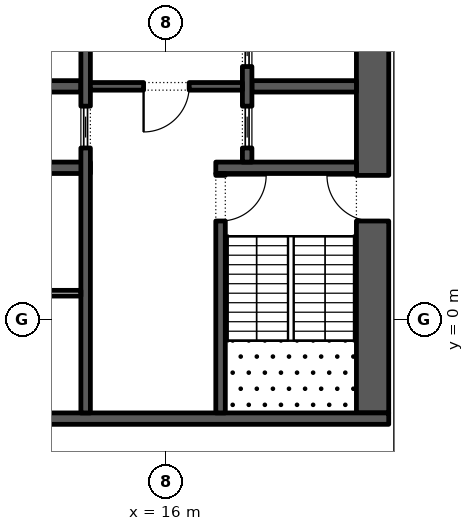
"""IFC4 building model, lengths in metres.
Left out: names, types, materials, properties, quantities, classifications, styles, units other than length and angle.
Written with IfcOpenShell. Run it as: python <this file> out.ifc"""

import sys

from ifc_helpers import new_model, si_unit, direction, frame, frame_2d, origin, place, context, subcontext, project, spatial, rectangle, extrude, element, fill, save


model = new_model("IFC4")
c1 = context("Model", 3, precision=1e-05, world=origin(), true_north=direction((0.0, 1.0)))
c2 = subcontext(c1, "Body", "Model", "MODEL_VIEW")
j1 = project(units=[si_unit("LENGTHUNIT", "METRE"), si_unit("PLANEANGLEUNIT", "RADIAN")], contexts=[c1])
p1 = place(None, origin())
s1 = spatial("IfcSite", under=j1, at=p1, CompositionType="ELEMENT")
p2 = place(p1, origin())
s2 = spatial("IfcBuilding", under=s1, at=p2, CompositionType="ELEMENT")
p3 = place(p2, frame((0.0, 0.0, 109.8)))
s3 = spatial("IfcBuildingStorey", under=s2, at=p3, CompositionType="ELEMENT", Elevation=109.8)
p4 = place(p3, frame((21.425, -2.45, 0.0), z_axis=(0.0, 0.0, 1.0), x_axis=(0.0, 1.0, 0.0)))
e1 = element("IfcWall", 1, at=p4, inside=s3, PredefinedType="SHEAR", context=c2, shape_type="SweptSolid", body=[
    extrude(rectangle(XDim=27.9, YDim=0.85, at=frame_2d((13.95, 0.0))), origin(), (0.0, 0.0, 1.0), 4.0),
])
p5 = place(p4, frame((5.05, 0.0, 0.0)))
e2 = element("IfcOpeningElement", 2, at=p5, cuts=e1, PredefinedType="OPENING", context=c2, shape_type="SweptSolid", body=[
    extrude(rectangle(XDim=1.2, YDim=2.1, at=frame_2d((0.6, 1.05))), frame((0.0, 0.435, 0.0), z_axis=(0.0, -1.0, 0.0), x_axis=(1.0, 0.0, 0.0)), (0.0, 0.0, 1.0), 0.87),
])
p6 = place(p4, frame((21.65, 0.0, 0.0)))
e3 = element("IfcOpeningElement", 3, at=p6, cuts=e1, PredefinedType="OPENING", context=c2, shape_type="SweptSolid", body=[
    extrude(rectangle(XDim=1.2, YDim=2.1, at=frame_2d((0.6, 1.05))), frame((0.0, 0.435, 0.0), z_axis=(0.0, -1.0, 0.0), x_axis=(1.0, 0.0, 0.0)), (0.0, 0.0, 1.0), 0.87),
])
p7 = place(p3, frame((10.15, -2.6, 0.0), z_axis=(0.0, 0.0, 1.0), x_axis=(1.0, 0.0, 0.0)))
e4 = element("IfcWall", 4, at=p7, inside=s3, PredefinedType="SHEAR", context=c2, shape_type="SweptSolid", body=[
    extrude(rectangle(XDim=11.7, YDim=0.3, at=frame_2d((5.85, 0.0))), origin(), (0.0, 0.0, 1.0), 4.0),
])
p8 = place(p3, frame((17.3, 4.0, 0.0), z_axis=(0.0, 0.0, 1.0), x_axis=(1.0, 0.0, 0.0)))
e5 = element("IfcWall", 5, at=p8, inside=s3, PredefinedType="SHEAR", context=c2, shape_type="SweptSolid", body=[
    extrude(rectangle(XDim=3.7, YDim=0.3, at=frame_2d((1.85, 0.0))), origin(), (0.0, 0.0, 1.0), 4.0),
])
p9 = place(p3, frame((17.425, -2.45, 0.0), z_axis=(0.0, 0.0, 1.0), x_axis=(0.0, 1.0, 0.0)))
e6 = element("IfcWall", 6, at=p9, inside=s3, PredefinedType="SHEAR", context=c2, shape_type="SweptSolid", body=[
    extrude(rectangle(XDim=6.3, YDim=0.25, at=frame_2d((3.15, 0.0))), origin(), (0.0, 0.0, 1.0), 4.0),
])
p10 = place(p9, frame((5.05, 0.0, 0.0)))
e7 = element("IfcOpeningElement", 7, at=p10, cuts=e6, PredefinedType="OPENING", context=c2, shape_type="SweptSolid", body=[
    extrude(rectangle(XDim=1.2, YDim=2.1, at=frame_2d((0.6, 1.05))), frame((0.0, 0.135, 0.0), z_axis=(0.0, -1.0, 0.0), x_axis=(1.0, 0.0, 0.0)), (0.0, 0.0, 1.0), 0.27),
])
p11 = place(p3, frame((18.25, 6.143, 0.0), z_axis=(0.0, 0.0, 1.0), x_axis=(1.0, 0.0, 0.0)))
e8 = element("IfcWall", 8, at=p11, inside=s3, PredefinedType="SHEAR", context=c2, shape_type="SweptSolid", body=[
    extrude(rectangle(XDim=2.75, YDim=0.3, at=frame_2d((1.375, 0.0))), origin(), (0.0, 0.0, 1.0), 4.0),
])
p12 = place(p3, frame((18.125, 4.15, 0.0), z_axis=(0.0, 0.0, 1.0), x_axis=(0.0, 1.0, 0.0)))
e9 = element("IfcWall", 9, at=p12, inside=s3, PredefinedType="SHEAR", context=c2, shape_type="SweptSolid", body=[
    extrude(rectangle(XDim=14.7, YDim=0.25, at=frame_2d((7.35, 0.0))), origin(), (0.0, 0.0, 1.0), 4.0),
])
p13 = place(p12, frame((0.371, 0.0, 0.0)))
e10 = element("IfcOpeningElement", 10, at=p13, cuts=e9, PredefinedType="OPENING", context=c2, shape_type="SweptSolid", body=[
    extrude(rectangle(XDim=1.1, YDim=2.1, at=frame_2d((0.55, 1.05))), frame((0.0, 0.135, 0.0), z_axis=(0.0, -1.0, 0.0), x_axis=(1.0, 0.0, 0.0)), (0.0, 0.0, 1.0), 0.27),
])
p14 = place(p12, frame((2.514, 0.0, 0.0)))
e11 = element("IfcOpeningElement", 11, at=p14, cuts=e9, PredefinedType="OPENING", context=c2, shape_type="SweptSolid", body=[
    extrude(rectangle(XDim=1.1, YDim=2.1, at=frame_2d((0.55, 1.05))), frame((0.0, 0.135, 0.0), z_axis=(0.0, -1.0, 0.0), x_axis=(1.0, 0.0, 0.0)), (0.0, 0.0, 1.0), 0.27),
])
p15 = place(p12, frame((4.657, 0.0, 0.0)))
e12 = element("IfcOpeningElement", 12, at=p15, cuts=e9, PredefinedType="OPENING", context=c2, shape_type="SweptSolid", body=[
    extrude(rectangle(XDim=1.1, YDim=2.1, at=frame_2d((0.55, 1.05))), frame((0.0, 0.135, 0.0), z_axis=(0.0, -1.0, 0.0), x_axis=(1.0, 0.0, 0.0)), (0.0, 0.0, 1.0), 0.27),
])
p16 = place(p12, frame((6.8, 0.0, 0.0)))
e13 = element("IfcOpeningElement", 13, at=p16, cuts=e9, PredefinedType="OPENING", context=c2, shape_type="SweptSolid", body=[
    extrude(rectangle(XDim=1.1, YDim=2.1, at=frame_2d((0.55, 1.05))), frame((0.0, 0.135, 0.0), z_axis=(0.0, -1.0, 0.0), x_axis=(1.0, 0.0, 0.0)), (0.0, 0.0, 1.0), 0.27),
])
p17 = place(p12, frame((8.943, 0.0, 0.0)))
e14 = element("IfcOpeningElement", 14, at=p17, cuts=e9, PredefinedType="OPENING", context=c2, shape_type="SweptSolid", body=[
    extrude(rectangle(XDim=1.1, YDim=2.1, at=frame_2d((0.55, 1.05))), frame((0.0, 0.135, 0.0), z_axis=(0.0, -1.0, 0.0), x_axis=(1.0, 0.0, 0.0)), (0.0, 0.0, 1.0), 0.27),
])
p18 = place(p12, frame((11.086, 0.0, 0.0)))
e15 = element("IfcOpeningElement", 15, at=p18, cuts=e9, PredefinedType="OPENING", context=c2, shape_type="SweptSolid", body=[
    extrude(rectangle(XDim=1.1, YDim=2.1, at=frame_2d((0.55, 1.05))), frame((0.0, 0.135, 0.0), z_axis=(0.0, -1.0, 0.0), x_axis=(1.0, 0.0, 0.0)), (0.0, 0.0, 1.0), 0.27),
])
p19 = place(p12, frame((13.229, 0.0, 0.0)))
e16 = element("IfcOpeningElement", 16, at=p19, cuts=e9, PredefinedType="OPENING", context=c2, shape_type="SweptSolid", body=[
    extrude(rectangle(XDim=1.1, YDim=2.1, at=frame_2d((0.55, 1.05))), frame((0.0, 0.135, 0.0), z_axis=(0.0, -1.0, 0.0), x_axis=(1.0, 0.0, 0.0)), (0.0, 0.0, 1.0), 0.27),
])
p20 = place(p3, frame((11.0, 4.0, 0.0), z_axis=(0.0, 0.0, 1.0), x_axis=(1.0, 0.0, 0.0)))
e17 = element("IfcWall", 17, at=p20, inside=s3, PredefinedType="SHEAR", context=c2, shape_type="SweptSolid", body=[
    extrude(rectangle(XDim=3.0, YDim=0.3, at=frame_2d((1.5, 0.0))), origin(), (0.0, 0.0, 1.0), 4.0),
])
p21 = place(p3, frame((11.0, 6.143, 0.0), z_axis=(0.0, 0.0, 1.0), x_axis=(1.0, 0.0, 0.0)))
e18 = element("IfcWall", 18, at=p21, inside=s3, PredefinedType="SHEAR", context=c2, shape_type="SweptSolid", body=[
    extrude(rectangle(XDim=2.75, YDim=0.3, at=frame_2d((1.375, 0.0))), origin(), (0.0, 0.0, 1.0), 4.0),
])
p22 = place(p3, frame((13.875, -2.45, 0.0), z_axis=(0.0, 0.0, 1.0), x_axis=(0.0, 1.0, 0.0)))
e19 = element("IfcWall", 19, at=p22, inside=s3, PredefinedType="SHEAR", context=c2, shape_type="SweptSolid", body=[
    extrude(rectangle(XDim=21.3, YDim=0.25, at=frame_2d((10.65, 0.0))), origin(), (0.0, 0.0, 1.0), 4.0),
])
p23 = place(p22, frame((14.571, 0.0, 0.0)))
e20 = element("IfcOpeningElement", 20, at=p23, cuts=e19, PredefinedType="OPENING", context=c2, shape_type="SweptSolid", body=[
    extrude(rectangle(XDim=0.9, YDim=2.1, at=frame_2d((0.45, 1.05))), frame((0.0, 0.135, 0.0), z_axis=(0.0, -1.0, 0.0), x_axis=(1.0, 0.0, 0.0)), (0.0, 0.0, 1.0), 0.27),
])
p24 = place(p22, frame((6.971, 0.0, 0.0)))
e21 = element("IfcOpeningElement", 21, at=p24, cuts=e19, PredefinedType="OPENING", context=c2, shape_type="SweptSolid", body=[
    extrude(rectangle(XDim=1.1, YDim=2.1, at=frame_2d((0.55, 1.05))), frame((0.0, 0.135, 0.0), z_axis=(0.0, -1.0, 0.0), x_axis=(1.0, 0.0, 0.0)), (0.0, 0.0, 1.0), 0.27),
])
p25 = place(p3, frame((14.0, 6.143, 0.0), z_axis=(0.0, 0.0, 1.0), x_axis=(1.0, 0.0, 0.0)))
e22 = element("IfcWall", 22, at=p25, inside=s3, PredefinedType="SHEAR", context=c2, shape_type="SweptSolid", body=[
    extrude(rectangle(XDim=4.0, YDim=0.2, at=frame_2d((2.0, 0.0))), origin(), (0.0, 0.0, 1.0), 4.0),
])
p26 = place(p25, frame((1.4, 0.0, 0.0)))
e23 = element("IfcOpeningElement", 23, at=p26, cuts=e22, PredefinedType="OPENING", context=c2, shape_type="SweptSolid", body=[
    extrude(rectangle(XDim=1.2, YDim=2.1, at=frame_2d((0.6, 1.05))), frame((0.0, 0.11, 0.0), z_axis=(0.0, -1.0, 0.0), x_axis=(1.0, 0.0, 0.0)), (0.0, 0.0, 1.0), 0.22),
])
p27 = place(p3, frame((11.0, 0.7, 0.0), z_axis=(0.0, 0.0, 1.0), x_axis=(1.0, 0.0, 0.0)))
e24 = element("IfcWall", 24, at=p27, inside=s3, PredefinedType="PARTITIONING", context=c2, shape_type="SweptSolid", body=[
    extrude(rectangle(XDim=2.75, YDim=0.15, at=frame_2d((1.375, 0.0))), origin(), (0.0, 0.0, 1.0), 4.0),
])
p28 = place(p13, origin())
e25 = element("IfcDoor", 25, at=p28, inside=s3, OperationType="SLIDING_TO_LEFT", PredefinedType="DOOR", context=c2, shape_type="SweptSolid", body=[
    extrude(rectangle(XDim=1.1, YDim=2.1, at=frame_2d((0.55, 1.05))), frame((0.0, 0.025, 0.0), z_axis=(0.0, -1.0, 0.0), x_axis=(1.0, 0.0, 0.0)), (0.0, 0.0, 1.0), 0.05),
])
fill(e10, e25)
p29 = place(p14, origin())
e26 = element("IfcDoor", 26, at=p29, inside=s3, OperationType="SLIDING_TO_LEFT", PredefinedType="DOOR", context=c2, shape_type="SweptSolid", body=[
    extrude(rectangle(XDim=1.1, YDim=2.1, at=frame_2d((0.55, 1.05))), frame((0.0, 0.025, 0.0), z_axis=(0.0, -1.0, 0.0), x_axis=(1.0, 0.0, 0.0)), (0.0, 0.0, 1.0), 0.05),
])
fill(e11, e26)
p30 = place(p24, origin())
e27 = element("IfcDoor", 27, at=p30, inside=s3, OperationType="SLIDING_TO_LEFT", PredefinedType="DOOR", context=c2, shape_type="SweptSolid", body=[
    extrude(rectangle(XDim=1.1, YDim=2.1, at=frame_2d((0.55, 1.05))), frame((0.0, 0.025, 0.0), z_axis=(0.0, -1.0, 0.0), x_axis=(1.0, 0.0, 0.0)), (0.0, 0.0, 1.0), 0.05),
])
fill(e21, e27)
p31 = place(p26, frame((1.2, 0.0, 0.0), z_axis=(0.0, 0.0, 1.0), x_axis=(-1.0, 0.0, 0.0)))
e28 = element("IfcDoor", 28, at=p31, inside=s3, OperationType="SINGLE_SWING_LEFT", PredefinedType="DOOR", context=c2, shape_type="SweptSolid", body=[
    extrude(rectangle(XDim=1.2, YDim=2.1, at=frame_2d((0.6, 1.05))), frame((0.0, 0.025, 0.0), z_axis=(0.0, -1.0, 0.0), x_axis=(1.0, 0.0, 0.0)), (0.0, 0.0, 1.0), 0.05),
])
fill(e23, e28)
p32 = place(p10, frame((1.2, 0.0, 0.0), z_axis=(0.0, 0.0, 1.0), x_axis=(-1.0, 0.0, 0.0)))
e29 = element("IfcDoor", 29, at=p32, inside=s3, OperationType="SINGLE_SWING_RIGHT", PredefinedType="DOOR", context=c2, shape_type="SweptSolid", body=[
    extrude(rectangle(XDim=1.2, YDim=2.1, at=frame_2d((0.6, 1.05))), frame((0.0, 0.025, 0.0), z_axis=(0.0, -1.0, 0.0), x_axis=(1.0, 0.0, 0.0)), (0.0, 0.0, 1.0), 0.05),
])
fill(e7, e29)
p33 = place(p5, origin())
e30 = element("IfcDoor", 30, at=p33, inside=s3, OperationType="SINGLE_SWING_LEFT", PredefinedType="DOOR", context=c2, shape_type="SweptSolid", body=[
    extrude(rectangle(XDim=1.2, YDim=2.1, at=frame_2d((0.6, 1.05))), frame((0.0, 0.025, 0.0), z_axis=(0.0, -1.0, 0.0), x_axis=(1.0, 0.0, 0.0)), (0.0, 0.0, 1.0), 0.05),
])
fill(e2, e30)
save(model, sys.argv[1])
